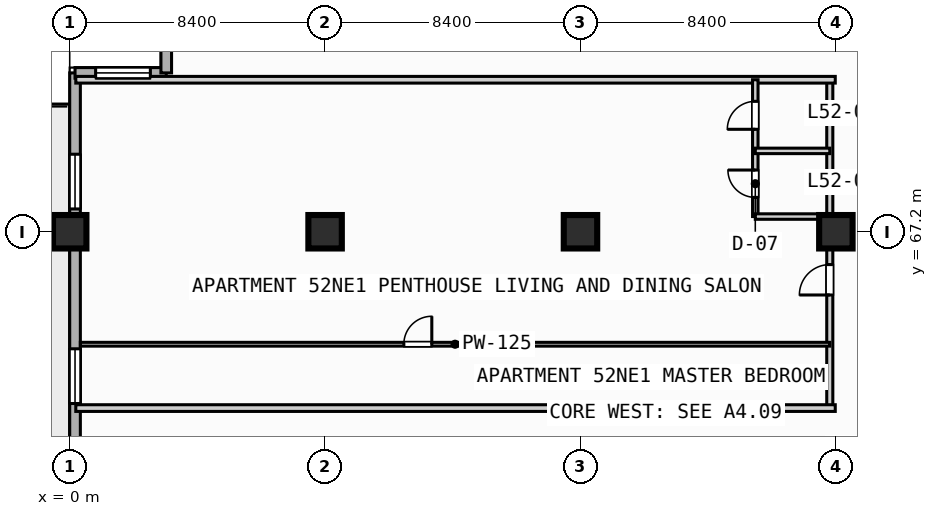
"""IFC4 building model, lengths in metres.
Left out: names, types, materials, properties, quantities, classifications, styles, units other than length and angle.
Written with IfcOpenShell. Run it as: python <this file> out.ifc"""

import sys

from ifc_helpers import new_model, si_unit, direction, frame, frame_2d, origin, origin_2d, place, context, subcontext, project, spatial, rectangle, extrude, element, fill, save


model = new_model("IFC4")
c1 = context("Model", 3, precision=1e-05, world=origin(), true_north=direction((0.0, 1.0)))
c2 = subcontext(c1, "Body", "Model", "MODEL_VIEW")
j1 = project(units=[si_unit("LENGTHUNIT", "METRE"), si_unit("PLANEANGLEUNIT", "RADIAN")], contexts=[c1])
p1 = place(None, origin())
s1 = spatial("IfcSite", under=j1, at=p1, CompositionType="ELEMENT")
p2 = place(p1, origin())
s2 = spatial("IfcBuilding", under=s1, at=p2, CompositionType="ELEMENT")
p3 = place(p2, frame((0.0, 0.0, 212.4)))
s3 = spatial("IfcBuildingStorey", under=s2, at=p3, CompositionType="ELEMENT", Elevation=212.4)
for number, where, z_axis, x_axis in (
    (1, (0.0, 67.2, 0.0), (0.0, 0.0, 1.0), (1.0, 0.0, 0.0)),
    (2, (8.4, 67.2, 0.0), (0.0, 0.0, 1.0), (1.0, 0.0, 0.0)),
    (3, (16.8, 67.2, 0.0), (0.0, 0.0, 1.0), (1.0, 0.0, 0.0)),
    (4, (25.2, 67.2, 0.0), (0.0, 0.0, 1.0), (1.0, 0.0, 0.0)),
):
    element("IfcColumn", number, at=place(p3, frame(where, z_axis=z_axis, x_axis=x_axis)), inside=s3, PredefinedType="COLUMN", context=c2, shape_type="SweptSolid", body=[
        extrude(rectangle(XDim=1.1, YDim=1.1, at=origin_2d()), origin(), (0.0, 0.0, 1.0), 3.7),
    ])
p4 = place(p3, frame((0.175, 3.175, 0.0), z_axis=(0.0, 0.0, 1.0), x_axis=(0.0, 1.0, 0.0)))
e5 = element("IfcWall", 5, at=p4, inside=s3, PredefinedType="STANDARD", context=c2, shape_type="SweptSolid", body=[
    extrude(rectangle(XDim=69.25, YDim=0.35, at=frame_2d((34.625, 0.0))), origin(), (0.0, 0.0, 1.0), 3.47),
])
p5 = place(p4, frame((42.325, 0.0, 0.0)))
e6 = element("IfcOpeningElement", 6, at=p5, cuts=e5, PredefinedType="OPENING", context=c2, shape_type="SweptSolid", body=[
    extrude(rectangle(XDim=1.4, YDim=2.2, at=frame_2d((0.7, 1.1))), frame((0.0, 0.185, 0.0), z_axis=(0.0, -1.0, 0.0), x_axis=(1.0, 0.0, 0.0)), (0.0, 0.0, 1.0), 0.37),
])
p6 = place(p4, frame((25.025, 0.0, 0.85)))
e7 = element("IfcOpeningElement", 7, at=p6, cuts=e5, PredefinedType="OPENING", context=c2, shape_type="SweptSolid", body=[
    extrude(rectangle(XDim=2.4, YDim=1.95, at=frame_2d((1.2, 0.975))), frame((0.0, 0.185, 0.0), z_axis=(0.0, -1.0, 0.0), x_axis=(1.0, 0.0, 0.0)), (0.0, 0.0, 1.0), 0.37),
])
p7 = place(p4, frame((33.725, 0.0, 0.85)))
e8 = element("IfcOpeningElement", 8, at=p7, cuts=e5, PredefinedType="OPENING", context=c2, shape_type="SweptSolid", body=[
    extrude(rectangle(XDim=1.8, YDim=1.8, at=frame_2d((0.9, 0.9))), frame((0.0, 0.185, 0.0), z_axis=(0.0, -1.0, 0.0), x_axis=(1.0, 0.0, 0.0)), (0.0, 0.0, 1.0), 0.37),
])
p8 = place(p4, frame((58.375, 0.0, 0.85)))
e9 = element("IfcOpeningElement", 9, at=p8, cuts=e5, PredefinedType="OPENING", context=c2, shape_type="SweptSolid", body=[
    extrude(rectangle(XDim=1.8, YDim=1.8, at=frame_2d((0.9, 0.9))), frame((0.0, 0.185, 0.0), z_axis=(0.0, -1.0, 0.0), x_axis=(1.0, 0.0, 0.0)), (0.0, 0.0, 1.0), 0.37),
])
p9 = place(p4, frame((64.775, 0.0, 0.85)))
e10 = element("IfcOpeningElement", 10, at=p9, cuts=e5, PredefinedType="OPENING", context=c2, shape_type="SweptSolid", body=[
    extrude(rectangle(XDim=1.8, YDim=1.8, at=frame_2d((0.9, 0.9))), frame((0.0, 0.185, 0.0), z_axis=(0.0, -1.0, 0.0), x_axis=(1.0, 0.0, 0.0)), (0.0, 0.0, 1.0), 0.37),
])
p10 = place(p3, frame((0.175, 72.425, 0.0), z_axis=(0.0, 0.0, 1.0), x_axis=(1.0, 0.0, 0.0)))
e11 = element("IfcWall", 11, at=p10, inside=s3, PredefinedType="STANDARD", context=c2, shape_type="SweptSolid", body=[
    extrude(rectangle(XDim=3.0, YDim=0.35, at=frame_2d((1.5, 0.0))), origin(), (0.0, 0.0, 1.0), 3.47),
])
p11 = place(p10, frame((0.677, 0.0, 0.85)))
e12 = element("IfcOpeningElement", 12, at=p11, cuts=e11, PredefinedType="OPENING", context=c2, shape_type="SweptSolid", body=[
    extrude(rectangle(XDim=1.8, YDim=1.8, at=frame_2d((0.9, 0.9))), frame((0.0, 0.185, 0.0), z_axis=(0.0, -1.0, 0.0), x_axis=(1.0, 0.0, 0.0)), (0.0, 0.0, 1.0), 0.37),
])
p12 = place(p3, frame((3.175, 72.425, 0.0), z_axis=(0.0, 0.0, 1.0), x_axis=(0.0, 1.0, 0.0)))
e13 = element("IfcWall", 13, at=p12, inside=s3, PredefinedType="STANDARD", context=c2, shape_type="SweptSolid", body=[
    extrude(rectangle(XDim=3.0, YDim=0.35, at=frame_2d((1.5, 0.0))), origin(), (0.0, 0.0, 1.0), 3.47),
])
p13 = place(p3, frame((25.0, 61.4, 0.0), z_axis=(0.0, 0.0, 1.0), x_axis=(0.0, 1.0, 0.0)))
e14 = element("IfcWall", 14, at=p13, inside=s3, PredefinedType="PARTITIONING", context=c2, shape_type="SweptSolid", body=[
    extrude(rectangle(XDim=10.8, YDim=0.2, at=frame_2d((5.4, 0.0))), origin(), (0.0, 0.0, 1.0), 2.82),
])
p14 = place(p13, frame((3.72, 0.0, 0.0)))
e15 = element("IfcOpeningElement", 15, at=p14, cuts=e14, PredefinedType="OPENING", context=c2, shape_type="SweptSolid", body=[
    extrude(rectangle(XDim=1.0, YDim=2.15, at=frame_2d((0.5, 1.075))), frame((0.0, 0.11, 0.0), z_axis=(0.0, -1.0, 0.0), x_axis=(1.0, 0.0, 0.0)), (0.0, 0.0, 1.0), 0.22),
])
for number, where, z_axis, x_axis in (
    (16, (0.2, 61.4, 0.0), (0.0, 0.0, 1.0), (1.0, 0.0, 0.0)),
    (17, (0.2, 72.2, 0.0), (0.0, 0.0, 1.0), (1.0, 0.0, 0.0)),
):
    element("IfcWall", number, at=place(p3, frame(where, z_axis=z_axis, x_axis=x_axis)), inside=s3, PredefinedType="PARTITIONING", context=c2, shape_type="SweptSolid", body=[
        extrude(rectangle(XDim=24.98, YDim=0.22, at=frame_2d((12.49, 0.0))), origin(), (0.0, 0.0, 1.0), 3.47),
    ])
p15 = place(p3, frame((22.55, 67.7, 0.0), z_axis=(0.0, 0.0, 1.0), x_axis=(0.0, 1.0, 0.0)))
e18 = element("IfcWall", 18, at=p15, inside=s3, PredefinedType="PLUMBINGWALL", context=c2, shape_type="SweptSolid", body=[
    extrude(rectangle(XDim=4.5, YDim=0.18, at=frame_2d((2.25, 0.0))), origin(), (0.0, 0.0, 1.0), 3.47),
])
p16 = place(p15, frame((0.63, 0.0, 0.0)))
e19 = element("IfcOpeningElement", 19, at=p16, cuts=e18, PredefinedType="OPENING", context=c2, shape_type="SweptSolid", body=[
    extrude(rectangle(XDim=0.9, YDim=2.1, at=frame_2d((0.45, 1.05))), frame((0.0, 0.1, 0.0), z_axis=(0.0, -1.0, 0.0), x_axis=(1.0, 0.0, 0.0)), (0.0, 0.0, 1.0), 0.2),
])
p17 = place(p15, frame((2.87, 0.0, 0.0)))
e20 = element("IfcOpeningElement", 20, at=p17, cuts=e18, PredefinedType="OPENING", context=c2, shape_type="SweptSolid", body=[
    extrude(rectangle(XDim=0.92, YDim=2.1, at=frame_2d((0.46, 1.05))), frame((0.0, 0.1, 0.0), z_axis=(0.0, -1.0, 0.0), x_axis=(1.0, 0.0, 0.0)), (0.0, 0.0, 1.0), 0.2),
])
for number, where, z_axis, x_axis in (
    (21, (22.55, 67.7, 0.0), (0.0, 0.0, 1.0), (1.0, 0.0, 0.0)),
    (22, (22.55, 69.86, 0.0), (0.0, 0.0, 1.0), (1.0, 0.0, 0.0)),
):
    element("IfcWall", number, at=place(p3, frame(where, z_axis=z_axis, x_axis=x_axis)), inside=s3, PredefinedType="PLUMBINGWALL", context=c2, shape_type="SweptSolid", body=[
        extrude(rectangle(XDim=2.45, YDim=0.18, at=frame_2d((1.225, 0.0))), origin(), (0.0, 0.0, 1.0), 3.47),
    ])
p18 = place(p3, frame((0.35, 63.5, 0.0), z_axis=(0.0, 0.0, 1.0), x_axis=(1.0, 0.0, 0.0)))
e23 = element("IfcWall", 23, at=p18, inside=s3, PredefinedType="PARTITIONING", context=c2, shape_type="SweptSolid", body=[
    extrude(rectangle(XDim=24.65, YDim=0.125, at=frame_2d((12.325, 0.0))), origin(), (0.0, 0.0, 1.0), 3.47),
])
p19 = place(p18, frame((10.64, 0.0, 0.0)))
e24 = element("IfcOpeningElement", 24, at=p19, cuts=e23, PredefinedType="OPENING", context=c2, shape_type="SweptSolid", body=[
    extrude(rectangle(XDim=0.92, YDim=2.1, at=frame_2d((0.46, 1.05))), frame((0.0, 0.073, 0.0), z_axis=(0.0, -1.0, 0.0), x_axis=(1.0, 0.0, 0.0)), (0.0, 0.0, 1.0), 0.145),
])
p20 = place(p8, origin())
e25 = element("IfcWindow", 25, at=p20, inside=s3, PartitioningType="SINGLE_PANEL", PredefinedType="WINDOW", context=c2, shape_type="SweptSolid", body=[
    extrude(rectangle(XDim=1.8, YDim=1.8, at=frame_2d((0.9, 0.9))), frame((0.0, 0.03, 0.0), z_axis=(0.0, -1.0, 0.0), x_axis=(1.0, 0.0, 0.0)), (0.0, 0.0, 1.0), 0.06),
])
fill(e9, e25)
p21 = place(p9, origin())
e26 = element("IfcWindow", 26, at=p21, inside=s3, PartitioningType="SINGLE_PANEL", PredefinedType="WINDOW", context=c2, shape_type="SweptSolid", body=[
    extrude(rectangle(XDim=1.8, YDim=1.8, at=frame_2d((0.9, 0.9))), frame((0.0, 0.03, 0.0), z_axis=(0.0, -1.0, 0.0), x_axis=(1.0, 0.0, 0.0)), (0.0, 0.0, 1.0), 0.06),
])
fill(e10, e26)
p22 = place(p11, origin())
e27 = element("IfcWindow", 27, at=p22, inside=s3, PartitioningType="SINGLE_PANEL", PredefinedType="WINDOW", context=c2, shape_type="SweptSolid", body=[
    extrude(rectangle(XDim=1.8, YDim=1.8, at=frame_2d((0.9, 0.9))), frame((0.0, 0.03, 0.0), z_axis=(0.0, -1.0, 0.0), x_axis=(1.0, 0.0, 0.0)), (0.0, 0.0, 1.0), 0.06),
])
fill(e12, e27)
p23 = place(p14, origin())
e28 = element("IfcDoor", 28, at=p23, inside=s3, OperationType="SINGLE_SWING_LEFT", PredefinedType="DOOR", context=c2, shape_type="SweptSolid", body=[
    extrude(rectangle(XDim=1.0, YDim=2.15, at=frame_2d((0.5, 1.075))), frame((0.0, 0.025, 0.0), z_axis=(0.0, -1.0, 0.0), x_axis=(1.0, 0.0, 0.0)), (0.0, 0.0, 1.0), 0.05),
])
fill(e15, e28)
p24 = place(p16, origin())
e29 = element("IfcDoor", 29, at=p24, inside=s3, OperationType="SINGLE_SWING_RIGHT", PredefinedType="DOOR", context=c2, shape_type="SweptSolid", body=[
    extrude(rectangle(XDim=0.9, YDim=2.1, at=frame_2d((0.45, 1.05))), frame((0.0, 0.025, 0.0), z_axis=(0.0, -1.0, 0.0), x_axis=(1.0, 0.0, 0.0)), (0.0, 0.0, 1.0), 0.05),
])
fill(e19, e29)
p25 = place(p17, origin())
e30 = element("IfcDoor", 30, at=p25, inside=s3, OperationType="SINGLE_SWING_LEFT", PredefinedType="DOOR", context=c2, shape_type="SweptSolid", body=[
    extrude(rectangle(XDim=0.92, YDim=2.1, at=frame_2d((0.46, 1.05))), frame((0.0, 0.025, 0.0), z_axis=(0.0, -1.0, 0.0), x_axis=(1.0, 0.0, 0.0)), (0.0, 0.0, 1.0), 0.05),
])
fill(e20, e30)
p26 = place(p19, origin())
e31 = element("IfcDoor", 31, at=p26, inside=s3, OperationType="SINGLE_SWING_RIGHT", PredefinedType="DOOR", context=c2, shape_type="SweptSolid", body=[
    extrude(rectangle(XDim=0.92, YDim=2.1, at=frame_2d((0.46, 1.05))), frame((0.0, 0.025, 0.0), z_axis=(0.0, -1.0, 0.0), x_axis=(1.0, 0.0, 0.0)), (0.0, 0.0, 1.0), 0.05),
])
fill(e24, e31)
save(model, sys.argv[1])
